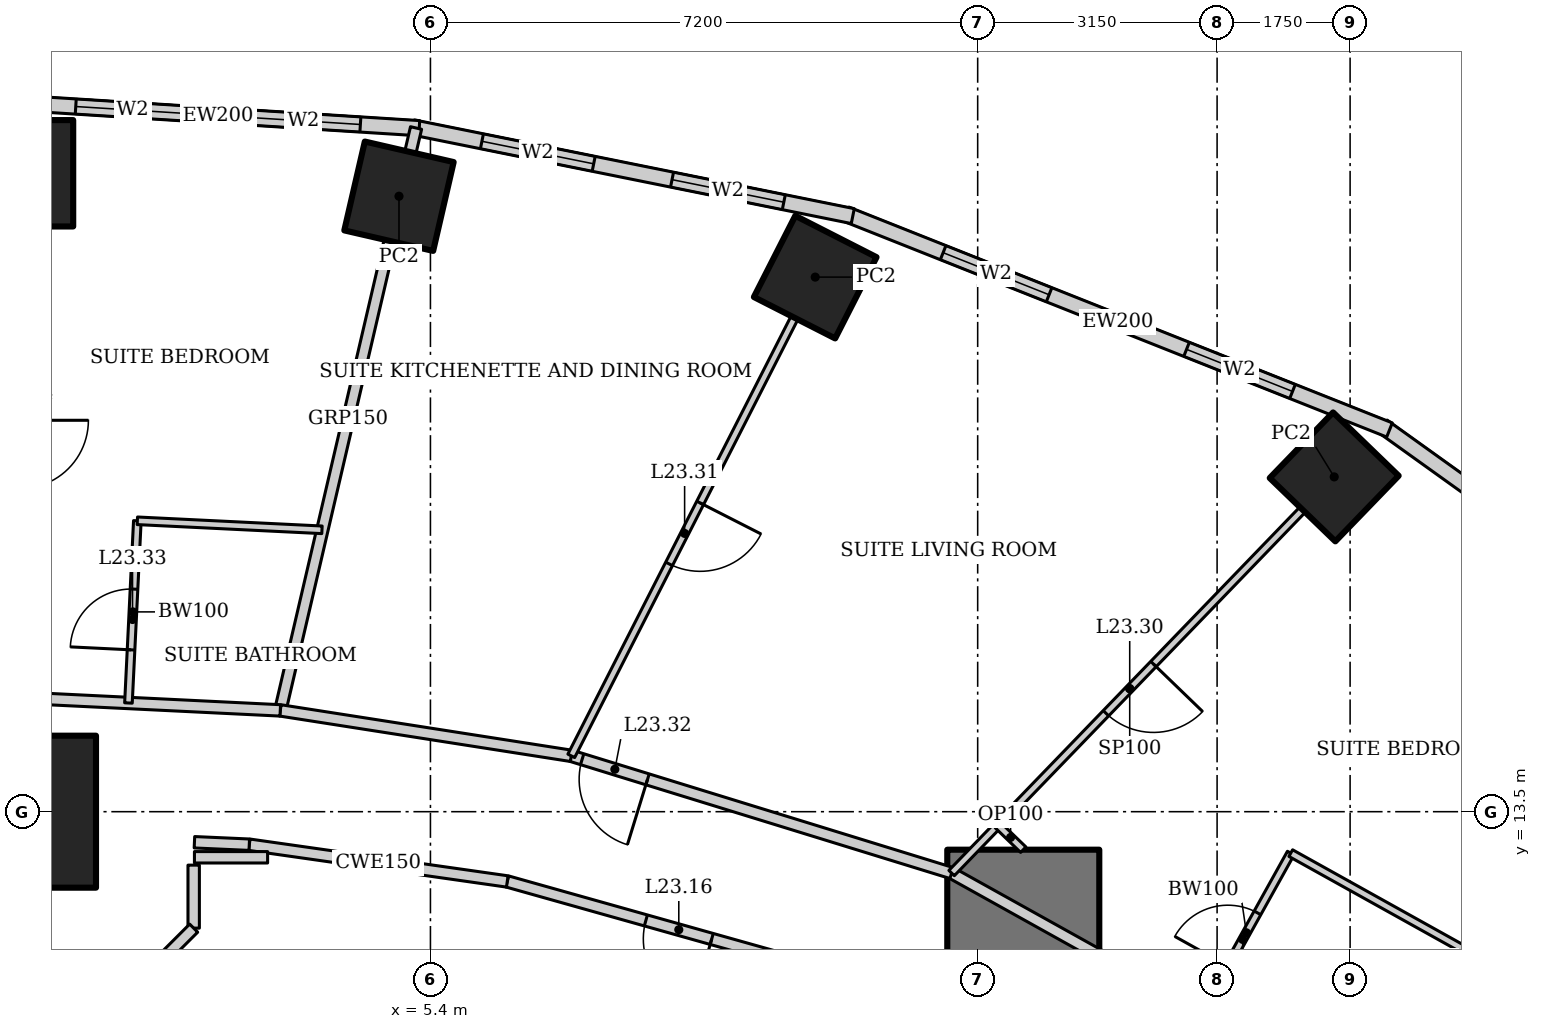
"""IFC4 building model, lengths in metres.
Left out: names, types, materials, properties, quantities, classifications, styles, units other than length and angle.
Written with IfcOpenShell. Run it as: python <this file> out.ifc"""

import sys

from ifc_helpers import new_model, si_unit, direction, frame, frame_2d, origin, origin_2d, place, context, subcontext, project, spatial, rectangle, hollow_rectangle, extrude, element, fill, save


model = new_model("IFC4")
c1 = context("Model", 3, precision=1e-05, world=origin(), true_north=direction((0.0, 1.0)))
c2 = subcontext(c1, "Body", "Model", "MODEL_VIEW")
j1 = project(units=[si_unit("LENGTHUNIT", "METRE"), si_unit("PLANEANGLEUNIT", "RADIAN")], contexts=[c1])
p1 = place(None, origin())
s1 = spatial("IfcSite", under=j1, at=p1, CompositionType="ELEMENT")
p2 = place(p1, origin())
s2 = spatial("IfcBuilding", under=s1, at=p2, CompositionType="ELEMENT")
p3 = place(p2, frame((0.0, 0.0, 98.2)))
s3 = spatial("IfcBuildingStorey", under=s2, at=p3, CompositionType="ELEMENT", Elevation=98.2)
p4 = place(p3, frame((0.0, 13.5, 0.0), z_axis=(0.0, 0.0, 1.0), x_axis=(1.0, 0.0, 0.0)))
e1 = element("IfcColumn", 1, at=p4, inside=s3, PredefinedType="COLUMN", context=c2, shape_type="SweptSolid", body=[
    extrude(hollow_rectangle(XDim=2.0, YDim=2.0, WallThickness=0.17, at=origin_2d()), origin(), (0.0, 0.0, 1.0), 3.6),
])
for number, where, z_axis, x_axis in (
    (2, (17.291, 17.905, 0.0), (0.0, 0.0, 1.0), (0.695, 0.719, 0.0)),
    (3, (10.463, 20.534, 0.0), (0.0, 0.0, 1.0), (0.454, 0.891, 0.0)),
    (4, (4.986, 21.598, 0.0), (0.0, 0.0, 1.0), (0.225, 0.974, 0.0)),
):
    element("IfcColumn", number, at=place(p3, frame(where, z_axis=z_axis, x_axis=x_axis)), inside=s3, PredefinedType="COLUMN", context=c2, shape_type="SweptSolid", body=[
        extrude(hollow_rectangle(XDim=1.2, YDim=1.2, WallThickness=0.1, at=origin_2d()), origin(), (0.0, 0.0, 1.0), 3.6),
    ])
p5 = place(p3, frame((0.0, 21.9, 0.0), z_axis=(0.0, 0.0, 1.0), x_axis=(1.0, 0.0, 0.0)))
e5 = element("IfcColumn", 5, at=p5, inside=s3, PredefinedType="COLUMN", context=c2, shape_type="SweptSolid", body=[
    extrude(hollow_rectangle(XDim=1.4, YDim=1.4, WallThickness=0.1, at=origin_2d()), origin(), (0.0, 0.0, 1.0), 3.6),
])
p6 = place(p3, frame((13.2, -13.0, 0.0), z_axis=(0.0, 0.0, 1.0), x_axis=(0.0, 1.0, 0.0)))
e6 = element("IfcWall", 6, at=p6, inside=s3, PredefinedType="SHEAR", context=c2, shape_type="SweptSolid", body=[
    extrude(rectangle(XDim=26.0, YDim=2.0, at=frame_2d((13.0, 0.0))), origin(), (0.0, 0.0, 1.0), 3.6),
])
p7 = place(p6, frame((12.1, 0.0, 0.0)))
e7 = element("IfcOpeningElement", 7, at=p7, cuts=e6, PredefinedType="OPENING", context=c2, shape_type="SweptSolid", body=[
    extrude(rectangle(XDim=1.8, YDim=2.1, at=frame_2d((0.9, 1.05))), frame((0.0, 1.01, 0.0), z_axis=(0.0, -1.0, 0.0), x_axis=(1.0, 0.0, 0.0)), (0.0, 0.0, 1.0), 2.02),
])
p8 = place(p3, frame((24.482, 13.875, 0.0), z_axis=(0.0, 0.0, 1.0), x_axis=(-0.812791321576, 0.582554948112, 0.0)))
e8 = element("IfcWall", 8, at=p8, inside=s3, PredefinedType="SOLIDWALL", context=c2, shape_type="SweptSolid", body=[
    extrude(rectangle(XDim=8.063, YDim=0.2, at=frame_2d((4.032, 0.0))), origin(), (0.0, 0.0, 1.0), 3.45),
])
p9 = place(p8, frame((1.466, 0.0, 0.5)))
e9 = element("IfcOpeningElement", 9, at=p9, cuts=e8, PredefinedType="OPENING", context=c2, shape_type="SweptSolid", body=[
    extrude(rectangle(XDim=1.5, YDim=2.2, at=frame_2d((0.75, 1.1))), frame((0.0, 0.11, 0.0), z_axis=(0.0, -1.0, 0.0), x_axis=(1.0, 0.0, 0.0)), (0.0, 0.0, 1.0), 0.22),
])
p10 = place(p8, frame((5.097, 0.0, 0.5)))
e10 = element("IfcOpeningElement", 10, at=p10, cuts=e8, PredefinedType="OPENING", context=c2, shape_type="SweptSolid", body=[
    extrude(rectangle(XDim=1.5, YDim=2.2, at=frame_2d((0.75, 1.1))), frame((0.0, 0.11, 0.0), z_axis=(0.0, -1.0, 0.0), x_axis=(1.0, 0.0, 0.0)), (0.0, 0.0, 1.0), 0.22),
])
p11 = place(p3, frame((18.018, 18.523, 0.0), z_axis=(0.0, 0.0, 1.0), x_axis=(-0.929358351251, 0.369178892895, 0.0)))
e11 = element("IfcWall", 11, at=p11, inside=s3, PredefinedType="SOLIDWALL", context=c2, shape_type="SweptSolid", body=[
    extrude(rectangle(XDim=7.692, YDim=0.2, at=frame_2d((3.846, 0.0))), origin(), (0.0, 0.0, 1.0), 3.45),
])
p12 = place(p11, frame((1.373, 0.0, 0.5)))
e12 = element("IfcOpeningElement", 12, at=p12, cuts=e11, PredefinedType="OPENING", context=c2, shape_type="SweptSolid", body=[
    extrude(rectangle(XDim=1.5, YDim=2.2, at=frame_2d((0.75, 1.1))), frame((0.0, 0.11, 0.0), z_axis=(0.0, -1.0, 0.0), x_axis=(1.0, 0.0, 0.0)), (0.0, 0.0, 1.0), 0.22),
])
p13 = place(p11, frame((4.819, 0.0, 0.5)))
e13 = element("IfcOpeningElement", 13, at=p13, cuts=e11, PredefinedType="OPENING", context=c2, shape_type="SweptSolid", body=[
    extrude(rectangle(XDim=1.5, YDim=2.2, at=frame_2d((0.75, 1.1))), frame((0.0, 0.11, 0.0), z_axis=(0.0, -1.0, 0.0), x_axis=(1.0, 0.0, 0.0)), (0.0, 0.0, 1.0), 0.22),
])
p14 = place(p3, frame((10.957, 21.337, 0.0), z_axis=(0.0, 0.0, 1.0), x_axis=(-0.980251657452, 0.197754110105, 0.0)))
e14 = element("IfcWall", 14, at=p14, inside=s3, PredefinedType="SOLIDWALL", context=c2, shape_type="SweptSolid", body=[
    extrude(rectangle(XDim=5.904, YDim=0.2, at=frame_2d((2.952, 0.0))), origin(), (0.0, 0.0, 1.0), 3.45),
])
p15 = place(p14, frame((0.926, 0.0, 0.5)))
e15 = element("IfcOpeningElement", 15, at=p15, cuts=e14, PredefinedType="OPENING", context=c2, shape_type="SweptSolid", body=[
    extrude(rectangle(XDim=1.5, YDim=2.2, at=frame_2d((0.75, 1.1))), frame((0.0, 0.11, 0.0), z_axis=(0.0, -1.0, 0.0), x_axis=(1.0, 0.0, 0.0)), (0.0, 0.0, 1.0), 0.22),
])
p16 = place(p14, frame((3.478, 0.0, 0.5)))
e16 = element("IfcOpeningElement", 16, at=p16, cuts=e14, PredefinedType="OPENING", context=c2, shape_type="SweptSolid", body=[
    extrude(rectangle(XDim=1.5, YDim=2.2, at=frame_2d((0.75, 1.1))), frame((0.0, 0.11, 0.0), z_axis=(0.0, -1.0, 0.0), x_axis=(1.0, 0.0, 0.0)), (0.0, 0.0, 1.0), 0.22),
])
p17 = place(p3, frame((5.253, 22.493, 0.0), z_axis=(0.0, 0.0, 1.0), x_axis=(-0.998018582375, 0.062919863585, 0.0)))
e17 = element("IfcWall", 17, at=p17, inside=s3, PredefinedType="SOLIDWALL", context=c2, shape_type="SweptSolid", body=[
    extrude(rectangle(XDim=5.304, YDim=0.2, at=frame_2d((2.652, 0.0))), origin(), (0.0, 0.0, 1.0), 3.45),
])
p18 = place(p17, frame((0.776, 0.0, 0.5)))
e18 = element("IfcOpeningElement", 18, at=p18, cuts=e17, PredefinedType="OPENING", context=c2, shape_type="SweptSolid", body=[
    extrude(rectangle(XDim=1.5, YDim=2.2, at=frame_2d((0.75, 1.1))), frame((0.0, 0.11, 0.0), z_axis=(0.0, -1.0, 0.0), x_axis=(1.0, 0.0, 0.0)), (0.0, 0.0, 1.0), 0.22),
])
p19 = place(p17, frame((3.028, 0.0, 0.5)))
e19 = element("IfcOpeningElement", 19, at=p19, cuts=e17, PredefinedType="OPENING", context=c2, shape_type="SweptSolid", body=[
    extrude(rectangle(XDim=1.5, YDim=2.2, at=frame_2d((0.75, 1.1))), frame((0.0, 0.11, 0.0), z_axis=(0.0, -1.0, 0.0), x_axis=(1.0, 0.0, 0.0)), (0.0, 0.0, 1.0), 0.22),
])
p20 = place(p3, frame((24.435, 13.909, 0.0), z_axis=(0.0, 0.0, 1.0), x_axis=(-0.871075246657, -0.491149584813, 0.0)))
e20 = element("IfcWall", 20, at=p20, inside=s3, PredefinedType="PARTITIONING", context=c2, shape_type="SweptSolid", body=[
    extrude(rectangle(XDim=8.192, YDim=0.15, at=frame_2d((4.096, 0.0))), origin(), (0.0, 0.0, 1.0), 2.693),
])
p21 = place(p3, frame((5.211, 22.496, 0.0), z_axis=(0.0, 0.0, 1.0), x_axis=(-0.227056984461, -0.973881474209, 0.0)))
e21 = element("IfcWall", 21, at=p21, inside=s3, PredefinedType="PARTITIONING", context=c2, shape_type="SweptSolid", body=[
    extrude(rectangle(XDim=7.869, YDim=0.15, at=frame_2d((3.934, 0.0))), origin(), (0.0, 0.0, 1.0), 2.767),
])
p22 = place(p3, frame((17.299, 9.885, 0.0), z_axis=(0.0, 0.0, 1.0), x_axis=(-0.873695910579, 0.486472461541, 0.0)))
e22 = element("IfcWall", 22, at=p22, inside=s3, PredefinedType="PARTITIONING", context=c2, shape_type="SweptSolid", body=[
    extrude(rectangle(XDim=5.771, YDim=0.15, at=frame_2d((2.885, 0.0))), origin(), (0.0, 0.0, 1.0), 3.45),
])
p23 = place(p3, frame((12.257, 12.693, 0.0), z_axis=(0.0, 0.0, 1.0), x_axis=(-0.955657956744, 0.294478980085, 0.0)))
e23 = element("IfcWall", 23, at=p23, inside=s3, PredefinedType="PARTITIONING", context=c2, shape_type="SweptSolid", body=[
    extrude(rectangle(XDim=5.236, YDim=0.15, at=frame_2d((2.618, 0.0))), origin(), (0.0, 0.0, 1.0), 3.45),
])
p24 = place(p23, frame((4.186, 0.0, 0.0)))
e24 = element("IfcOpeningElement", 24, at=p24, cuts=e23, PredefinedType="OPENING", context=c2, shape_type="SweptSolid", body=[
    extrude(rectangle(XDim=0.9, YDim=2.1, at=frame_2d((0.45, 1.05))), frame((0.0, 0.085, 0.0), z_axis=(0.0, -1.0, 0.0), x_axis=(1.0, 0.0, 0.0)), (0.0, 0.0, 1.0), 0.17),
])
p25 = place(p3, frame((7.253, 14.235, 0.0), z_axis=(0.0, 0.0, 1.0), x_axis=(-0.988015036573, 0.154357660987, 0.0)))
e25 = element("IfcWall", 25, at=p25, inside=s3, PredefinedType="PARTITIONING", context=c2, shape_type="SweptSolid", body=[
    extrude(rectangle(XDim=3.875, YDim=0.15, at=frame_2d((1.938, 0.0))), origin(), (0.0, 0.0, 1.0), 3.45),
])
p26 = place(p3, frame((3.424, 14.833, 0.0), z_axis=(0.0, 0.0, 1.0), x_axis=(-0.998809560203, 0.048779733975, 0.0)))
e26 = element("IfcWall", 26, at=p26, inside=s3, PredefinedType="PARTITIONING", context=c2, shape_type="SweptSolid", body=[
    extrude(rectangle(XDim=3.428, YDim=0.15, at=frame_2d((1.714, 0.0))), origin(), (0.0, 0.0, 1.0), 3.45),
])
p27 = place(p3, frame((10.924, 11.312, 0.0), z_axis=(0.0, 0.0, 1.0), x_axis=(-0.962643729928, 0.270771211967, 0.0)))
e27 = element("IfcWall", 27, at=p27, inside=s3, PredefinedType="PARTITIONING", context=c2, shape_type="SweptSolid", body=[
    extrude(rectangle(XDim=4.688, YDim=0.15, at=frame_2d((2.344, 0.0))), origin(), (0.0, 0.0, 1.0), 3.45),
])
p28 = place(p27, frame((1.894, 0.0, 0.0)))
e28 = element("IfcOpeningElement", 28, at=p28, cuts=e27, PredefinedType="OPENING", context=c2, shape_type="SweptSolid", body=[
    extrude(rectangle(XDim=0.9, YDim=2.1, at=frame_2d((0.45, 1.05))), frame((0.0, 0.085, 0.0), z_axis=(0.0, -1.0, 0.0), x_axis=(1.0, 0.0, 0.0)), (0.0, 0.0, 1.0), 0.17),
])
p29 = place(p3, frame((6.411, 12.582, 0.0), z_axis=(0.0, 0.0, 1.0), x_axis=(-0.990002114939, 0.14105251652, 0.0)))
e29 = element("IfcWall", 29, at=p29, inside=s3, PredefinedType="PARTITIONING", context=c2, shape_type="SweptSolid", body=[
    extrude(rectangle(XDim=3.429, YDim=0.15, at=frame_2d((1.714, 0.0))), origin(), (0.0, 0.0, 1.0), 3.45),
])
p30 = place(p3, frame((15.552, 10.858, 0.0), z_axis=(0.0, 0.0, 1.0), x_axis=(0.486445964861, 0.873710663361, 0.0)))
e30 = element("IfcWall", 30, at=p30, inside=s3, PredefinedType="PARTITIONING", context=c2, shape_type="SweptSolid", body=[
    extrude(rectangle(XDim=2.4, YDim=0.1, at=frame_2d((1.2, 0.0))), origin(), (0.0, 0.0, 1.0), 3.45),
])
p31 = place(p30, frame((0.7, 0.0, 0.0)))
e31 = element("IfcOpeningElement", 31, at=p31, cuts=e30, PredefinedType="OPENING", context=c2, shape_type="SweptSolid", body=[
    extrude(rectangle(XDim=0.8, YDim=2.1, at=frame_2d((0.4, 1.05))), frame((0.0, 0.06, 0.0), z_axis=(0.0, -1.0, 0.0), x_axis=(1.0, 0.0, 0.0)), (0.0, 0.0, 1.0), 0.12),
])
p32 = place(p3, frame((16.719, 12.955, 0.0), z_axis=(0.0, 0.0, 1.0), x_axis=(0.873676251648, -0.486507766953, 0.0)))
e32 = element("IfcWall", 32, at=p32, inside=s3, PredefinedType="PARTITIONING", context=c2, shape_type="SweptSolid", body=[
    extrude(rectangle(XDim=3.45, YDim=0.1, at=frame_2d((1.725, 0.0))), origin(), (0.0, 0.0, 1.0), 3.45),
])
p33 = place(p3, frame((16.944, 17.545, 0.0), z_axis=(0.0, 0.0, 1.0), x_axis=(-0.694677175107, -0.719321640426, 0.0)))
e33 = element("IfcWall", 33, at=p33, inside=s3, PredefinedType="PARTITIONING", context=c2, shape_type="SweptSolid", body=[
    extrude(rectangle(XDim=6.746, YDim=0.1, at=frame_2d((3.373, 0.0))), origin(), (0.0, 0.0, 1.0), 2.528),
])
p34 = place(p33, frame((2.923, 0.0, 0.0)))
e34 = element("IfcOpeningElement", 34, at=p34, cuts=e33, PredefinedType="OPENING", context=c2, shape_type="SweptSolid", body=[
    extrude(rectangle(XDim=0.9, YDim=2.1, at=frame_2d((0.45, 1.05))), frame((0.0, 0.06, 0.0), z_axis=(0.0, -1.0, 0.0), x_axis=(1.0, 0.0, 0.0)), (0.0, 0.0, 1.0), 0.12),
])
p35 = place(p3, frame((10.236, 20.088, 0.0), z_axis=(0.0, 0.0, 1.0), x_axis=(-0.453993694696, -0.89100489627, 0.0)))
e35 = element("IfcWall", 35, at=p35, inside=s3, PredefinedType="PARTITIONING", context=c2, shape_type="SweptSolid", body=[
    extrude(rectangle(XDim=6.57, YDim=0.1, at=frame_2d((3.285, 0.0))), origin(), (0.0, 0.0, 1.0), 2.528),
])
p36 = place(p35, frame((2.835, 0.0, 0.0)))
e36 = element("IfcOpeningElement", 36, at=p36, cuts=e35, PredefinedType="OPENING", context=c2, shape_type="SweptSolid", body=[
    extrude(rectangle(XDim=0.9, YDim=2.1, at=frame_2d((0.45, 1.05))), frame((0.0, 0.06, 0.0), z_axis=(0.0, -1.0, 0.0), x_axis=(1.0, 0.0, 0.0)), (0.0, 0.0, 1.0), 0.12),
])
p37 = place(p3, frame((1.427, 14.93, 0.0), z_axis=(0.0, 0.0, 1.0), x_axis=(0.048831470304, 0.998807032168, 0.0)))
e37 = element("IfcWall", 37, at=p37, inside=s3, PredefinedType="PARTITIONING", context=c2, shape_type="SweptSolid", body=[
    extrude(rectangle(XDim=2.4, YDim=0.1, at=frame_2d((1.2, 0.0))), origin(), (0.0, 0.0, 1.0), 3.45),
])
p38 = place(p37, frame((0.7, 0.0, 0.0)))
e38 = element("IfcOpeningElement", 38, at=p38, cuts=e37, PredefinedType="OPENING", context=c2, shape_type="SweptSolid", body=[
    extrude(rectangle(XDim=0.8, YDim=2.1, at=frame_2d((0.4, 1.05))), frame((0.0, 0.06, 0.0), z_axis=(0.0, -1.0, 0.0), x_axis=(1.0, 0.0, 0.0)), (0.0, 0.0, 1.0), 0.12),
])
p39 = place(p3, frame((1.544, 17.327, 0.0), z_axis=(0.0, 0.0, 1.0), x_axis=(0.998813899717, -0.048690797202, 0.0)))
e39 = element("IfcWall", 39, at=p39, inside=s3, PredefinedType="PARTITIONING", context=c2, shape_type="SweptSolid", body=[
    extrude(rectangle(XDim=2.432, YDim=0.1, at=frame_2d((1.216, 0.0))), origin(), (0.0, 0.0, 1.0), 3.45),
])
p40 = place(p3, frame((13.2, 13.0, 0.0), z_axis=(0.0, 0.0, 1.0), x_axis=(-0.719347134512, 0.69465077562, 0.0)))
e40 = element("IfcWall", 40, at=p40, inside=s3, PredefinedType="PARTITIONING", context=c2, shape_type="SweptSolid", body=[
    extrude(rectangle(XDim=0.465, YDim=0.1, at=frame_2d((0.232, 0.0))), origin(), (0.0, 0.0, 1.0), 3.45),
])
p41 = place(p3, frame((3.016, 13.066, 0.0), z_axis=(0.0, 0.0, 1.0), x_axis=(-0.999003783932, 0.044625549739, 0.0)))
e41 = element("IfcWall", 41, at=p41, inside=s3, PredefinedType="PARTITIONING", context=c2, shape_type="SweptSolid", body=[
    extrude(rectangle(XDim=0.722, YDim=0.15, at=frame_2d((0.361, 0.0))), origin(), (0.0, 0.0, 1.0), 3.45),
])
p42 = place(p3, frame((3.258, 12.9, 0.0), z_axis=(0.0, 0.0, 1.0), x_axis=(-1.0, 0.0, 0.0)))
e42 = element("IfcWall", 42, at=p42, inside=s3, PredefinedType="PARTITIONING", context=c2, shape_type="SweptSolid", body=[
    extrude(rectangle(XDim=0.963, YDim=0.15, at=frame_2d((0.481, 0.0))), origin(), (0.0, 0.0, 1.0), 3.45),
])
p43 = place(p3, frame((2.285, 12.797, 0.0), z_axis=(0.0, 0.0, 1.0), x_axis=(0.0, -1.0, 0.0)))
e43 = element("IfcWall", 43, at=p43, inside=s3, PredefinedType="PARTITIONING", context=c2, shape_type="SweptSolid", body=[
    extrude(rectangle(XDim=0.829, YDim=0.15, at=frame_2d((0.415, 0.0))), origin(), (0.0, 0.0, 1.0), 3.45),
])
p44 = place(p3, frame((2.285, 11.968, 0.0), z_axis=(0.0, 0.0, 1.0), x_axis=(-0.707106781187, -0.707106781187, 0.0)))
e44 = element("IfcWall", 44, at=p44, inside=s3, PredefinedType="PARTITIONING", context=c2, shape_type="SweptSolid", body=[
    extrude(rectangle(XDim=1.064, YDim=0.15, at=frame_2d((0.532, 0.0))), origin(), (0.0, 0.0, 1.0), 3.45),
])
p45 = place(p12, origin())
e45 = element("IfcWindow", 45, at=p45, inside=s3, PartitioningType="SINGLE_PANEL", PredefinedType="WINDOW", context=c2, shape_type="SweptSolid", body=[
    extrude(rectangle(XDim=1.5, YDim=2.2, at=frame_2d((0.75, 1.1))), frame((0.0, 0.03, 0.0), z_axis=(0.0, -1.0, 0.0), x_axis=(1.0, 0.0, 0.0)), (0.0, 0.0, 1.0), 0.06),
])
fill(e12, e45)
p46 = place(p13, origin())
e46 = element("IfcWindow", 46, at=p46, inside=s3, PartitioningType="SINGLE_PANEL", PredefinedType="WINDOW", context=c2, shape_type="SweptSolid", body=[
    extrude(rectangle(XDim=1.5, YDim=2.2, at=frame_2d((0.75, 1.1))), frame((0.0, 0.03, 0.0), z_axis=(0.0, -1.0, 0.0), x_axis=(1.0, 0.0, 0.0)), (0.0, 0.0, 1.0), 0.06),
])
fill(e13, e46)
p47 = place(p15, origin())
e47 = element("IfcWindow", 47, at=p47, inside=s3, PartitioningType="SINGLE_PANEL", PredefinedType="WINDOW", context=c2, shape_type="SweptSolid", body=[
    extrude(rectangle(XDim=1.5, YDim=2.2, at=frame_2d((0.75, 1.1))), frame((0.0, 0.03, 0.0), z_axis=(0.0, -1.0, 0.0), x_axis=(1.0, 0.0, 0.0)), (0.0, 0.0, 1.0), 0.06),
])
fill(e15, e47)
p48 = place(p16, origin())
e48 = element("IfcWindow", 48, at=p48, inside=s3, PartitioningType="SINGLE_PANEL", PredefinedType="WINDOW", context=c2, shape_type="SweptSolid", body=[
    extrude(rectangle(XDim=1.5, YDim=2.2, at=frame_2d((0.75, 1.1))), frame((0.0, 0.03, 0.0), z_axis=(0.0, -1.0, 0.0), x_axis=(1.0, 0.0, 0.0)), (0.0, 0.0, 1.0), 0.06),
])
fill(e16, e48)
p49 = place(p18, origin())
e49 = element("IfcWindow", 49, at=p49, inside=s3, PartitioningType="SINGLE_PANEL", PredefinedType="WINDOW", context=c2, shape_type="SweptSolid", body=[
    extrude(rectangle(XDim=1.5, YDim=2.2, at=frame_2d((0.75, 1.1))), frame((0.0, 0.03, 0.0), z_axis=(0.0, -1.0, 0.0), x_axis=(1.0, 0.0, 0.0)), (0.0, 0.0, 1.0), 0.06),
])
fill(e18, e49)
p50 = place(p19, origin())
e50 = element("IfcWindow", 50, at=p50, inside=s3, PartitioningType="SINGLE_PANEL", PredefinedType="WINDOW", context=c2, shape_type="SweptSolid", body=[
    extrude(rectangle(XDim=1.5, YDim=2.2, at=frame_2d((0.75, 1.1))), frame((0.0, 0.03, 0.0), z_axis=(0.0, -1.0, 0.0), x_axis=(1.0, 0.0, 0.0)), (0.0, 0.0, 1.0), 0.06),
])
fill(e19, e50)
p51 = place(p28, origin())
e51 = element("IfcDoor", 51, at=p51, inside=s3, OperationType="SINGLE_SWING_LEFT", PredefinedType="DOOR", context=c2, shape_type="SweptSolid", body=[
    extrude(rectangle(XDim=0.9, YDim=2.1, at=frame_2d((0.45, 1.05))), frame((0.0, 0.025, 0.0), z_axis=(0.0, -1.0, 0.0), x_axis=(1.0, 0.0, 0.0)), (0.0, 0.0, 1.0), 0.05),
])
fill(e28, e51)
p52 = place(p31, origin())
e52 = element("IfcDoor", 52, at=p52, inside=s3, OperationType="SINGLE_SWING_LEFT", PredefinedType="DOOR", context=c2, shape_type="SweptSolid", body=[
    extrude(rectangle(XDim=0.8, YDim=2.1, at=frame_2d((0.4, 1.05))), frame((0.0, 0.025, 0.0), z_axis=(0.0, -1.0, 0.0), x_axis=(1.0, 0.0, 0.0)), (0.0, 0.0, 1.0), 0.05),
])
fill(e31, e52)
p53 = place(p34, origin())
e53 = element("IfcDoor", 53, at=p53, inside=s3, OperationType="SINGLE_SWING_LEFT", PredefinedType="DOOR", context=c2, shape_type="SweptSolid", body=[
    extrude(rectangle(XDim=0.9, YDim=2.1, at=frame_2d((0.45, 1.05))), frame((0.0, 0.025, 0.0), z_axis=(0.0, -1.0, 0.0), x_axis=(1.0, 0.0, 0.0)), (0.0, 0.0, 1.0), 0.05),
])
fill(e34, e53)
p54 = place(p36, origin())
e54 = element("IfcDoor", 54, at=p54, inside=s3, OperationType="SINGLE_SWING_LEFT", PredefinedType="DOOR", context=c2, shape_type="SweptSolid", body=[
    extrude(rectangle(XDim=0.9, YDim=2.1, at=frame_2d((0.45, 1.05))), frame((0.0, 0.025, 0.0), z_axis=(0.0, -1.0, 0.0), x_axis=(1.0, 0.0, 0.0)), (0.0, 0.0, 1.0), 0.05),
])
fill(e36, e54)
p55 = place(p24, origin())
e55 = element("IfcDoor", 55, at=p55, inside=s3, OperationType="SINGLE_SWING_LEFT", PredefinedType="DOOR", context=c2, shape_type="SweptSolid", body=[
    extrude(rectangle(XDim=0.9, YDim=2.1, at=frame_2d((0.45, 1.05))), frame((0.0, 0.025, 0.0), z_axis=(0.0, -1.0, 0.0), x_axis=(1.0, 0.0, 0.0)), (0.0, 0.0, 1.0), 0.05),
])
fill(e24, e55)
p56 = place(p38, origin())
e56 = element("IfcDoor", 56, at=p56, inside=s3, OperationType="SINGLE_SWING_LEFT", PredefinedType="DOOR", context=c2, shape_type="SweptSolid", body=[
    extrude(rectangle(XDim=0.8, YDim=2.1, at=frame_2d((0.4, 1.05))), frame((0.0, 0.025, 0.0), z_axis=(0.0, -1.0, 0.0), x_axis=(1.0, 0.0, 0.0)), (0.0, 0.0, 1.0), 0.05),
])
fill(e38, e56)
save(model, sys.argv[1])
